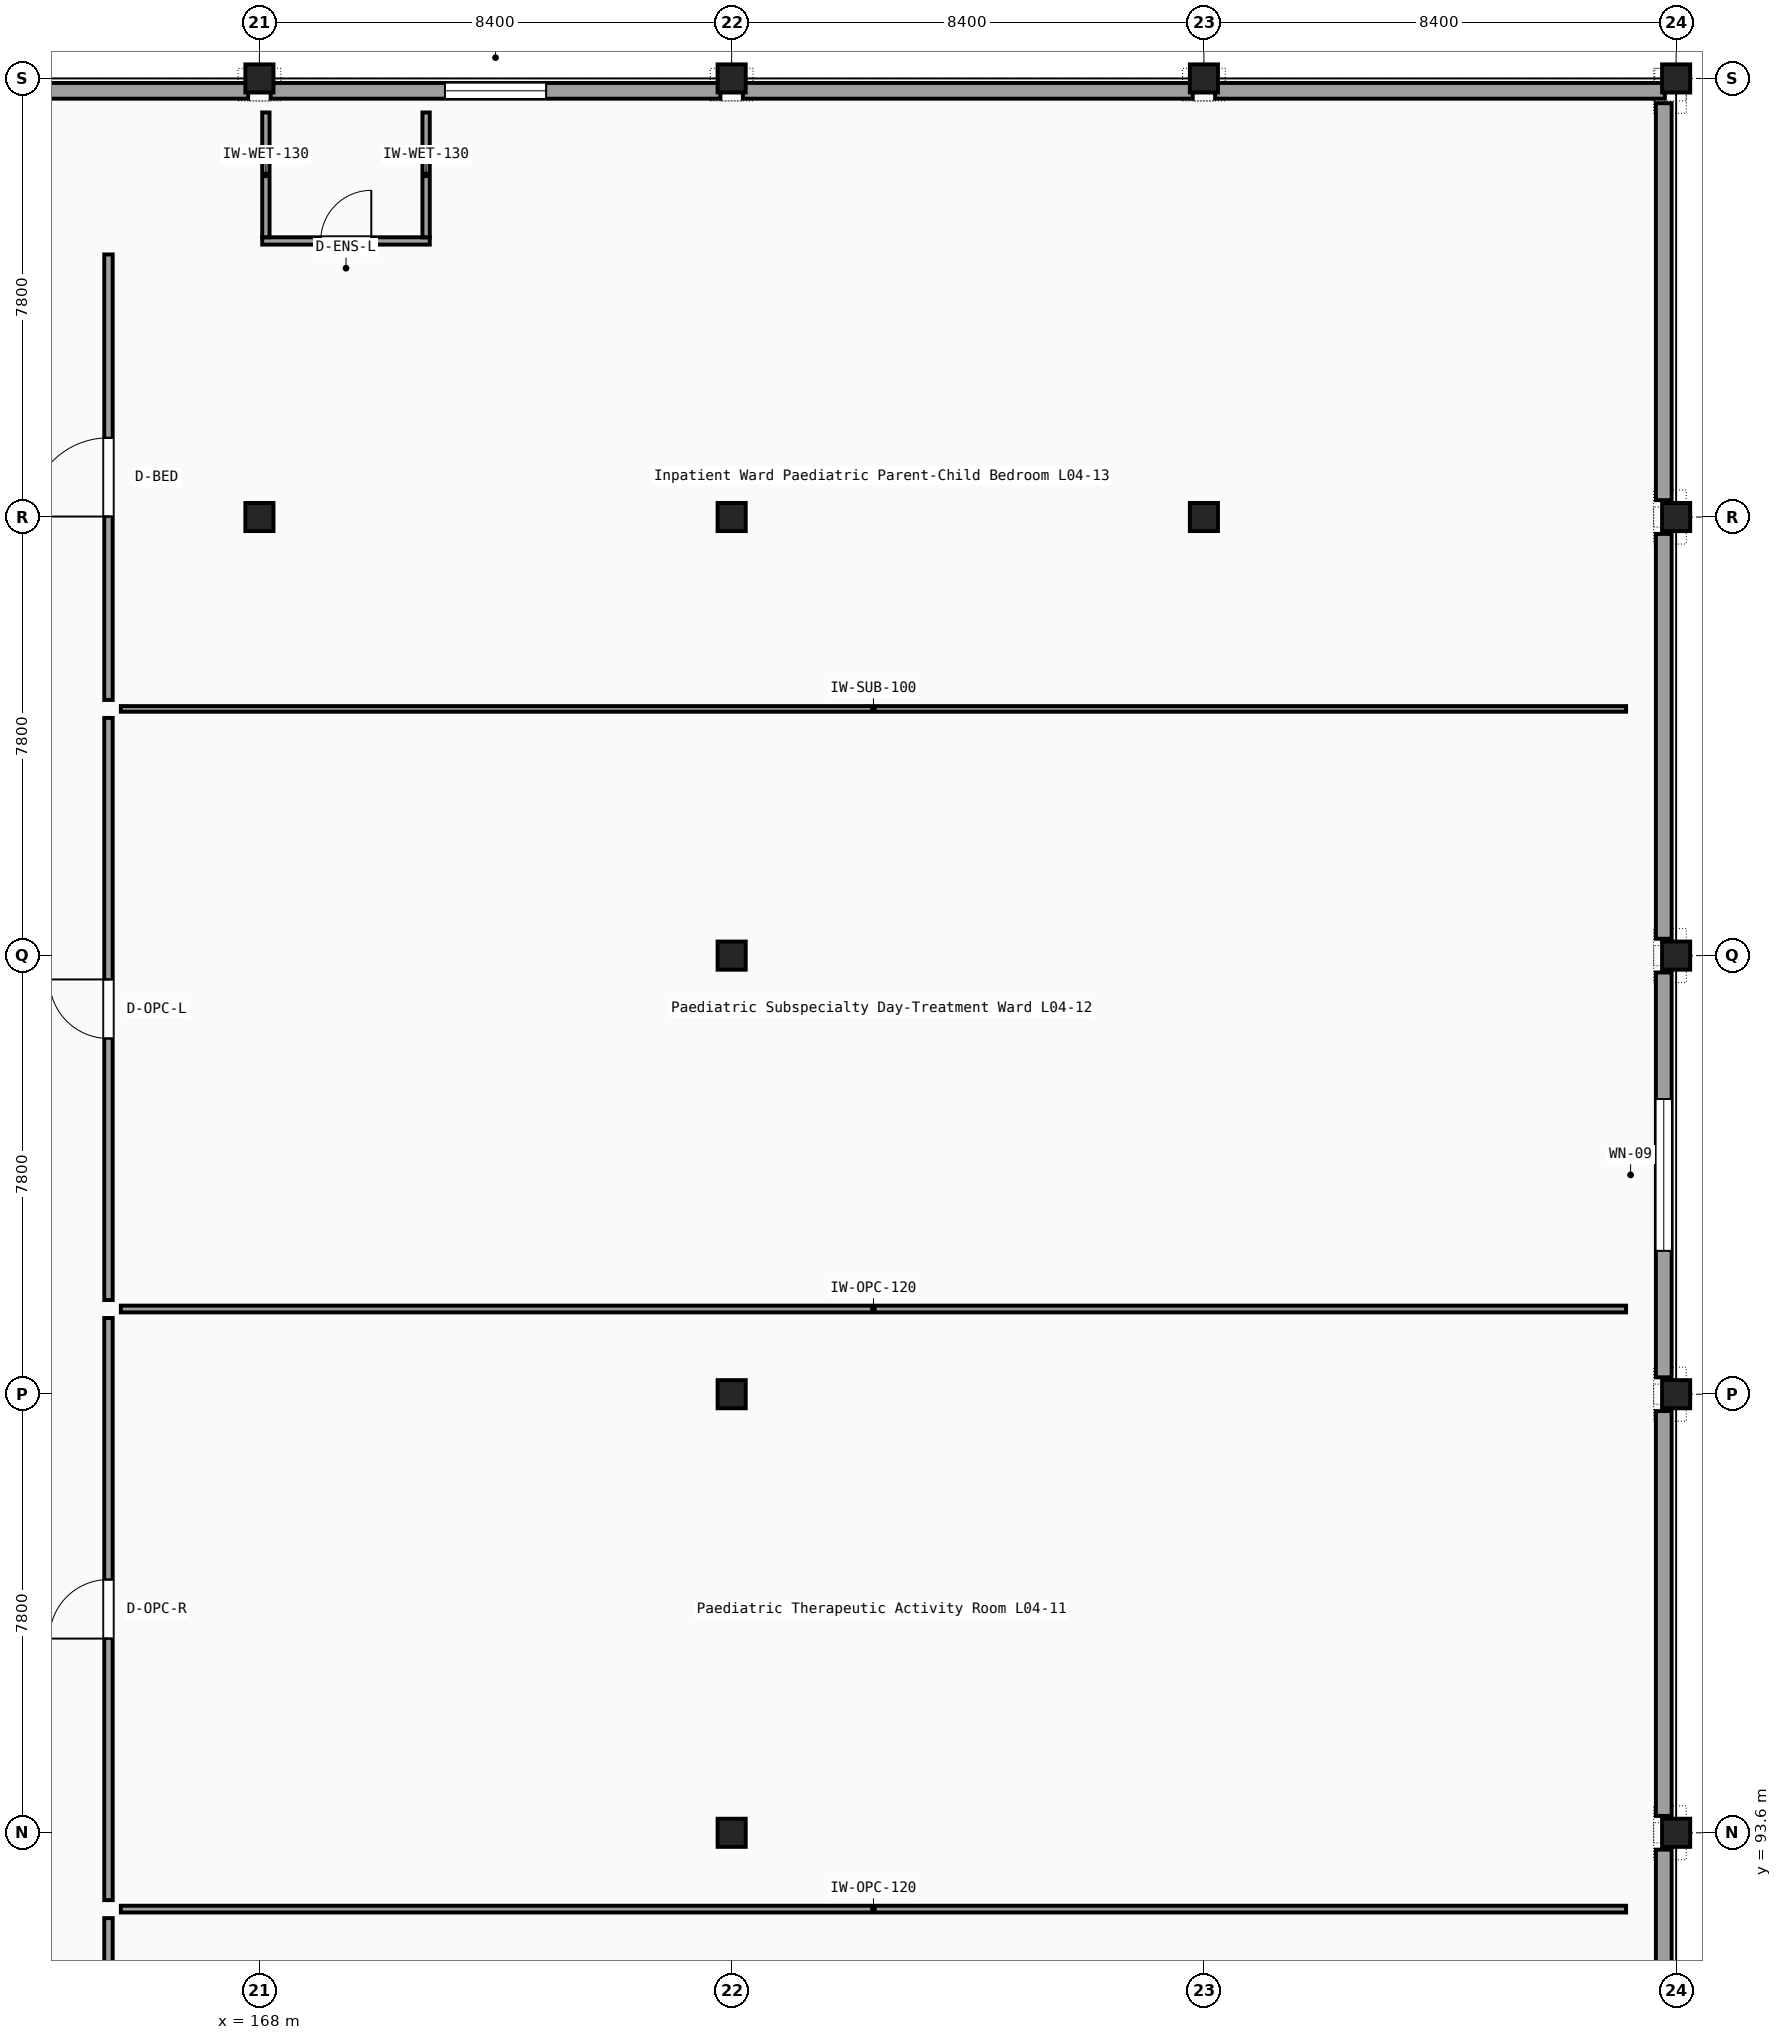
"""IFC4 building model, lengths in metres.
Left out: names, types, materials, properties, quantities, classifications, styles, units other than length and angle.
Written with IfcOpenShell. Run it as: python <this file> out.ifc"""

import sys

from ifc_helpers import new_model, si_unit, direction, frame, frame_2d, origin, origin_2d, place, context, subcontext, project, spatial, rectangle, i_section, extrude, element, fill, save


model = new_model("IFC4")
c1 = context("Model", 3, precision=1e-05, world=origin(), true_north=direction((0.0, 1.0)))
c2 = subcontext(c1, "Body", "Model", "MODEL_VIEW")
j1 = project(units=[si_unit("LENGTHUNIT", "METRE"), si_unit("PLANEANGLEUNIT", "RADIAN")], contexts=[c1])
p1 = place(None, origin())
s1 = spatial("IfcSite", under=j1, at=p1, CompositionType="ELEMENT")
p2 = place(p1, origin())
s2 = spatial("IfcBuilding", under=s1, at=p2, CompositionType="ELEMENT")
p3 = place(p2, frame((0.0, 0.0, 18.9)))
s3 = spatial("IfcBuildingStorey", under=s2, at=p3, CompositionType="ELEMENT", Elevation=18.9)
for number, where, z_axis, x_axis in (
    (1, (168.0, 117.0, 0.0), (0.0, 0.0, 1.0), (1.0, 0.0, 0.0)),
    (2, (168.0, 124.8, 0.0), (0.0, 0.0, 1.0), (1.0, 0.0, 0.0)),
    (3, (176.4, 93.6, 0.0), (0.0, 0.0, 1.0), (1.0, 0.0, 0.0)),
    (4, (176.4, 101.4, 0.0), (0.0, 0.0, 1.0), (1.0, 0.0, 0.0)),
    (5, (176.4, 109.2, 0.0), (0.0, 0.0, 1.0), (1.0, 0.0, 0.0)),
    (6, (176.4, 117.0, 0.0), (0.0, 0.0, 1.0), (1.0, 0.0, 0.0)),
    (7, (176.4, 124.8, 0.0), (0.0, 0.0, 1.0), (1.0, 0.0, 0.0)),
    (8, (184.8, 117.0, 0.0), (0.0, 0.0, 1.0), (1.0, 0.0, 0.0)),
    (9, (184.8, 124.8, 0.0), (0.0, 0.0, 1.0), (1.0, 0.0, 0.0)),
    (10, (193.2, 93.6, 0.0), (0.0, 0.0, 1.0), (1.0, 0.0, 0.0)),
    (11, (193.2, 101.4, 0.0), (0.0, 0.0, 1.0), (1.0, 0.0, 0.0)),
    (12, (193.2, 109.2, 0.0), (0.0, 0.0, 1.0), (1.0, 0.0, 0.0)),
    (13, (193.2, 117.0, 0.0), (0.0, 0.0, 1.0), (1.0, 0.0, 0.0)),
    (14, (193.2, 124.8, 0.0), (0.0, 0.0, 1.0), (1.0, 0.0, 0.0)),
):
    element("IfcColumn", number, at=place(p3, frame(where, z_axis=z_axis, x_axis=x_axis)), inside=s3, PredefinedType="COLUMN", context=c2, shape_type="SweptSolid", body=[
        extrude(i_section(OverallWidth=0.3, OverallDepth=0.5, WebThickness=0.014, FlangeThickness=0.028, FilletRadius=0.027, at=origin_2d()), origin(), (0.0, 0.0, 1.0), 4.05),
    ])
p4 = place(p3, frame((159.975, 124.58, 0.0), z_axis=(0.0, 0.0, 1.0), x_axis=(1.0, 0.0, 0.0)))
e15 = element("IfcWall", 15, at=p4, inside=s3, PredefinedType="SOLIDWALL", context=c2, shape_type="SweptSolid", body=[
    extrude(rectangle(XDim=7.825, YDim=0.28, at=frame_2d((3.913, 0.0))), origin(), (0.0, 0.0, 1.0), 3.52),
])
p5 = place(p3, frame((168.2, 124.58, 0.0), z_axis=(0.0, 0.0, 1.0), x_axis=(1.0, 0.0, 0.0)))
e16 = element("IfcWall", 16, at=p5, inside=s3, PredefinedType="SOLIDWALL", context=c2, shape_type="SweptSolid", body=[
    extrude(rectangle(XDim=8.0, YDim=0.28, at=frame_2d((4.0, 0.0))), origin(), (0.0, 0.0, 1.0), 3.52),
])
p6 = place(p5, frame((3.1, 0.0, 0.9)))
e17 = element("IfcOpeningElement", 17, at=p6, cuts=e16, PredefinedType="OPENING", context=c2, shape_type="SweptSolid", body=[
    extrude(rectangle(XDim=1.8, YDim=1.6, at=frame_2d((0.9, 0.8))), frame((0.0, 0.15, 0.0), z_axis=(0.0, -1.0, 0.0), x_axis=(1.0, 0.0, 0.0)), (0.0, 0.0, 1.0), 0.3),
])
for number, where, z_axis, x_axis in (
    (18, (176.6, 124.58, 0.0), (0.0, 0.0, 1.0), (1.0, 0.0, 0.0)),
    (19, (185.0, 124.58, 0.0), (0.0, 0.0, 1.0), (1.0, 0.0, 0.0)),
):
    element("IfcWall", number, at=place(p3, frame(where, z_axis=z_axis, x_axis=x_axis)), inside=s3, PredefinedType="SOLIDWALL", context=c2, shape_type="SweptSolid", body=[
        extrude(rectangle(XDim=8.0, YDim=0.28, at=frame_2d((4.0, 0.0))), origin(), (0.0, 0.0, 1.0), 3.52),
    ])
p7 = place(p3, frame((192.98, 86.1, 0.0), z_axis=(0.0, 0.0, 1.0), x_axis=(0.0, 1.0, 0.0)))
e20 = element("IfcWall", 20, at=p7, inside=s3, PredefinedType="SOLIDWALL", context=c2, shape_type="SweptSolid", body=[
    extrude(rectangle(XDim=7.2, YDim=0.28, at=frame_2d((3.6, 0.0))), origin(), (0.0, 0.0, 1.0), 3.25),
])
p8 = place(p3, frame((192.98, 93.9, 0.0), z_axis=(0.0, 0.0, 1.0), x_axis=(0.0, 1.0, 0.0)))
e21 = element("IfcWall", 21, at=p8, inside=s3, PredefinedType="SOLIDWALL", context=c2, shape_type="SweptSolid", body=[
    extrude(rectangle(XDim=7.2, YDim=0.28, at=frame_2d((3.6, 0.0))), origin(), (0.0, 0.0, 1.0), 3.25),
])
p9 = place(p3, frame((192.98, 101.7, 0.0), z_axis=(0.0, 0.0, 1.0), x_axis=(0.0, 1.0, 0.0)))
e22 = element("IfcWall", 22, at=p9, inside=s3, PredefinedType="SOLIDWALL", context=c2, shape_type="SweptSolid", body=[
    extrude(rectangle(XDim=7.2, YDim=0.28, at=frame_2d((3.6, 0.0))), origin(), (0.0, 0.0, 1.0), 3.25),
])
p10 = place(p9, frame((2.25, 0.0, 1.0)))
e23 = element("IfcOpeningElement", 23, at=p10, cuts=e22, PredefinedType="OPENING", context=c2, shape_type="SweptSolid", body=[
    extrude(rectangle(XDim=2.7, YDim=1.45, at=frame_2d((1.35, 0.725))), frame((0.0, 0.15, 0.0), z_axis=(0.0, -1.0, 0.0), x_axis=(1.0, 0.0, 0.0)), (0.0, 0.0, 1.0), 0.3),
])
p11 = place(p3, frame((192.98, 109.5, 0.0), z_axis=(0.0, 0.0, 1.0), x_axis=(0.0, 1.0, 0.0)))
e24 = element("IfcWall", 24, at=p11, inside=s3, PredefinedType="SOLIDWALL", context=c2, shape_type="SweptSolid", body=[
    extrude(rectangle(XDim=7.2, YDim=0.28, at=frame_2d((3.6, 0.0))), origin(), (0.0, 0.0, 1.0), 3.25),
])
p12 = place(p3, frame((192.98, 117.3, 0.0), z_axis=(0.0, 0.0, 1.0), x_axis=(0.0, 1.0, 0.0)))
e25 = element("IfcWall", 25, at=p12, inside=s3, PredefinedType="SOLIDWALL", context=c2, shape_type="SweptSolid", body=[
    extrude(rectangle(XDim=7.06, YDim=0.28, at=frame_2d((3.53, 0.0))), origin(), (0.0, 0.0, 1.0), 3.25),
])
p13 = place(p3, frame((165.315, 81.65, 0.0), z_axis=(0.0, 0.0, 1.0), x_axis=(0.0, 1.0, 0.0)))
e26 = element("IfcWall", 26, at=p13, inside=s3, PredefinedType="PARTITIONING", context=c2, shape_type="SweptSolid", body=[
    extrude(rectangle(XDim=10.433, YDim=0.15, at=frame_2d((5.216, 0.0))), origin(), (0.0, 0.0, 1.0), 3.52),
])
p14 = place(p13, frame((4.691, 0.0, 0.0)))
e27 = element("IfcOpeningElement", 27, at=p14, cuts=e26, PredefinedType="OPENING", context=c2, shape_type="SweptSolid", body=[
    extrude(rectangle(XDim=1.05, YDim=2.15, at=frame_2d((0.525, 1.075))), frame((0.0, 0.085, 0.0), z_axis=(0.0, -1.0, 0.0), x_axis=(1.0, 0.0, 0.0)), (0.0, 0.0, 1.0), 0.17),
])
p15 = place(p3, frame((165.535, 92.242, 0.0), z_axis=(0.0, 0.0, 1.0), x_axis=(1.0, 0.0, 0.0)))
e28 = element("IfcWall", 28, at=p15, inside=s3, PredefinedType="PARTITIONING", context=c2, shape_type="SweptSolid", body=[
    extrude(rectangle(XDim=26.775, YDim=0.12, at=frame_2d((13.388, 0.0))), origin(), (0.0, 0.0, 1.0), 3.53),
])
p16 = place(p3, frame((165.315, 92.403, 0.0), z_axis=(0.0, 0.0, 1.0), x_axis=(0.0, 1.0, 0.0)))
e29 = element("IfcWall", 29, at=p16, inside=s3, PredefinedType="PARTITIONING", context=c2, shape_type="SweptSolid", body=[
    extrude(rectangle(XDim=10.352, YDim=0.15, at=frame_2d((5.176, 0.0))), origin(), (0.0, 0.0, 1.0), 3.25),
])
p17 = place(p16, frame((4.651, 0.0, 0.0)))
e30 = element("IfcOpeningElement", 30, at=p17, cuts=e29, PredefinedType="OPENING", context=c2, shape_type="SweptSolid", body=[
    extrude(rectangle(XDim=1.05, YDim=2.15, at=frame_2d((0.525, 1.075))), frame((0.0, 0.085, 0.0), z_axis=(0.0, -1.0, 0.0), x_axis=(1.0, 0.0, 0.0)), (0.0, 0.0, 1.0), 0.17),
])
p18 = place(p3, frame((165.535, 102.915, 0.0), z_axis=(0.0, 0.0, 1.0), x_axis=(1.0, 0.0, 0.0)))
e31 = element("IfcWall", 31, at=p18, inside=s3, PredefinedType="PARTITIONING", context=c2, shape_type="SweptSolid", body=[
    extrude(rectangle(XDim=26.775, YDim=0.12, at=frame_2d((13.388, 0.0))), origin(), (0.0, 0.0, 1.0), 3.53),
])
p19 = place(p3, frame((165.315, 103.075, 0.0), z_axis=(0.0, 0.0, 1.0), x_axis=(0.0, 1.0, 0.0)))
e32 = element("IfcWall", 32, at=p19, inside=s3, PredefinedType="PARTITIONING", context=c2, shape_type="SweptSolid", body=[
    extrude(rectangle(XDim=10.353, YDim=0.15, at=frame_2d((5.176, 0.0))), origin(), (0.0, 0.0, 1.0), 3.25),
])
p20 = place(p19, frame((4.651, 0.0, 0.0)))
e33 = element("IfcOpeningElement", 33, at=p20, cuts=e32, PredefinedType="OPENING", context=c2, shape_type="SweptSolid", body=[
    extrude(rectangle(XDim=1.05, YDim=2.15, at=frame_2d((0.525, 1.075))), frame((0.0, 0.085, 0.0), z_axis=(0.0, -1.0, 0.0), x_axis=(1.0, 0.0, 0.0)), (0.0, 0.0, 1.0), 0.17),
])
p21 = place(p3, frame((165.535, 113.587, 0.0), z_axis=(0.0, 0.0, 1.0), x_axis=(1.0, 0.0, 0.0)))
e34 = element("IfcWall", 34, at=p21, inside=s3, PredefinedType="PARTITIONING", context=c2, shape_type="SweptSolid", body=[
    extrude(rectangle(XDim=26.775, YDim=0.1, at=frame_2d((13.388, 0.0))), origin(), (0.0, 0.0, 1.0), 3.53),
])
p22 = place(p3, frame((165.315, 113.748, 0.0), z_axis=(0.0, 0.0, 1.0), x_axis=(0.0, 1.0, 0.0)))
e35 = element("IfcWall", 35, at=p22, inside=s3, PredefinedType="PARTITIONING", context=c2, shape_type="SweptSolid", body=[
    extrude(rectangle(XDim=7.922, YDim=0.15, at=frame_2d((3.961, 0.0))), origin(), (0.0, 0.0, 1.0), 3.25),
])
p23 = place(p22, frame((3.261, 0.0, 0.0)))
e36 = element("IfcOpeningElement", 36, at=p23, cuts=e35, PredefinedType="OPENING", context=c2, shape_type="SweptSolid", body=[
    extrude(rectangle(XDim=1.4, YDim=2.2, at=frame_2d((0.7, 1.1))), frame((0.0, 0.085, 0.0), z_axis=(0.0, -1.0, 0.0), x_axis=(1.0, 0.0, 0.0)), (0.0, 0.0, 1.0), 0.17),
])
p24 = place(p3, frame((168.05, 121.91, 0.0), z_axis=(0.0, 0.0, 1.0), x_axis=(1.0, 0.0, 0.0)))
e37 = element("IfcWall", 37, at=p24, inside=s3, PredefinedType="PARTITIONING", context=c2, shape_type="SweptSolid", body=[
    extrude(rectangle(XDim=2.98, YDim=0.13, at=frame_2d((1.49, 0.0))), origin(), (0.0, 0.0, 1.0), 3.52),
])
p25 = place(p24, frame((1.04, 0.0, 0.0)))
e38 = element("IfcOpeningElement", 38, at=p25, cuts=e37, PredefinedType="OPENING", context=c2, shape_type="SweptSolid", body=[
    extrude(rectangle(XDim=0.9, YDim=2.1, at=frame_2d((0.45, 1.05))), frame((0.0, 0.075, 0.0), z_axis=(0.0, -1.0, 0.0), x_axis=(1.0, 0.0, 0.0)), (0.0, 0.0, 1.0), 0.15),
])
p26 = place(p3, frame((168.115, 121.975, 0.0), z_axis=(0.0, 0.0, 1.0), x_axis=(0.0, 1.0, 0.0)))
e39 = element("IfcWall", 39, at=p26, inside=s3, PredefinedType="PARTITIONING", context=c2, shape_type="SweptSolid", body=[
    extrude(rectangle(XDim=2.22, YDim=0.13, at=frame_2d((1.11, 0.0))), origin(), (0.0, 0.0, 1.0), 3.52),
])
p27 = place(p3, frame((170.965, 121.975, 0.0), z_axis=(0.0, 0.0, 1.0), x_axis=(0.0, 1.0, 0.0)))
e40 = element("IfcWall", 40, at=p27, inside=s3, PredefinedType="PARTITIONING", context=c2, shape_type="SweptSolid", body=[
    extrude(rectangle(XDim=2.22, YDim=0.13, at=frame_2d((1.11, 0.0))), origin(), (0.0, 0.0, 1.0), 3.77),
])
p28 = place(p6, origin())
e41 = element("IfcWindow", 41, at=p28, inside=s3, PartitioningType="SINGLE_PANEL", PredefinedType="WINDOW", context=c2, shape_type="SweptSolid", body=[
    extrude(rectangle(XDim=1.8, YDim=1.6, at=frame_2d((0.9, 0.8))), frame((0.0, 0.03, 0.0), z_axis=(0.0, -1.0, 0.0), x_axis=(1.0, 0.0, 0.0)), (0.0, 0.0, 1.0), 0.06),
])
fill(e17, e41)
p29 = place(p10, origin())
e42 = element("IfcWindow", 42, at=p29, inside=s3, PartitioningType="SINGLE_PANEL", PredefinedType="WINDOW", context=c2, shape_type="SweptSolid", body=[
    extrude(rectangle(XDim=2.7, YDim=1.45, at=frame_2d((1.35, 0.725))), frame((0.0, 0.03, 0.0), z_axis=(0.0, -1.0, 0.0), x_axis=(1.0, 0.0, 0.0)), (0.0, 0.0, 1.0), 0.06),
])
fill(e23, e42)
p30 = place(p17, origin())
e43 = element("IfcDoor", 43, at=p30, inside=s3, OperationType="SINGLE_SWING_LEFT", PredefinedType="DOOR", context=c2, shape_type="SweptSolid", body=[
    extrude(rectangle(XDim=1.05, YDim=2.15, at=frame_2d((0.525, 1.075))), frame((0.0, 0.025, 0.0), z_axis=(0.0, -1.0, 0.0), x_axis=(1.0, 0.0, 0.0)), (0.0, 0.0, 1.0), 0.05),
])
fill(e30, e43)
p31 = place(p20, origin())
e44 = element("IfcDoor", 44, at=p31, inside=s3, OperationType="SINGLE_SWING_RIGHT", PredefinedType="DOOR", context=c2, shape_type="SweptSolid", body=[
    extrude(rectangle(XDim=1.05, YDim=2.15, at=frame_2d((0.525, 1.075))), frame((0.0, 0.025, 0.0), z_axis=(0.0, -1.0, 0.0), x_axis=(1.0, 0.0, 0.0)), (0.0, 0.0, 1.0), 0.05),
])
fill(e33, e44)
p32 = place(p23, origin())
e45 = element("IfcDoor", 45, at=p32, inside=s3, OperationType="SINGLE_SWING_LEFT", PredefinedType="DOOR", context=c2, shape_type="SweptSolid", body=[
    extrude(rectangle(XDim=1.4, YDim=2.2, at=frame_2d((0.7, 1.1))), frame((0.0, 0.025, 0.0), z_axis=(0.0, -1.0, 0.0), x_axis=(1.0, 0.0, 0.0)), (0.0, 0.0, 1.0), 0.05),
])
fill(e36, e45)
p33 = place(p25, origin())
e46 = element("IfcDoor", 46, at=p33, inside=s3, OperationType="SINGLE_SWING_RIGHT", PredefinedType="DOOR", context=c2, shape_type="SweptSolid", body=[
    extrude(rectangle(XDim=0.9, YDim=2.1, at=frame_2d((0.45, 1.05))), frame((0.0, 0.025, 0.0), z_axis=(0.0, -1.0, 0.0), x_axis=(1.0, 0.0, 0.0)), (0.0, 0.0, 1.0), 0.05),
])
fill(e38, e46)
save(model, sys.argv[1])
